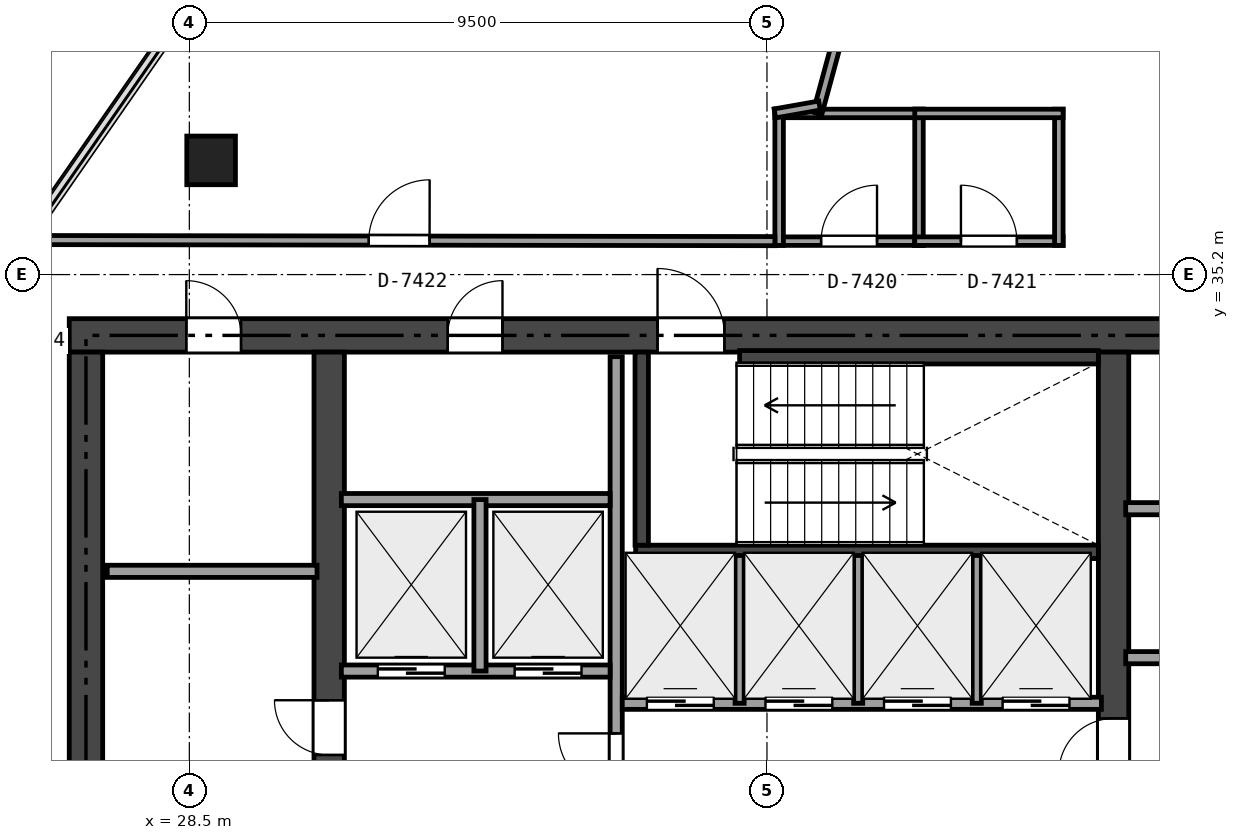
"""IFC4 building model, lengths in metres.
Left out: names, types, materials, properties, quantities, classifications, styles, units other than length and angle.
Written with IfcOpenShell. Run it as: python <this file> out.ifc"""

import sys

from ifc_helpers import new_model, si_unit, direction, frame, frame_2d, origin, origin_2d, place, context, subcontext, project, spatial, rectangle, extrude, element, fill, save


model = new_model("IFC4")
c1 = context("Model", 3, precision=1e-05, world=origin(), true_north=direction((0.0, 1.0)))
c2 = subcontext(c1, "Body", "Model", "MODEL_VIEW")
j1 = project(units=[si_unit("LENGTHUNIT", "METRE"), si_unit("PLANEANGLEUNIT", "RADIAN")], contexts=[c1])
p1 = place(None, origin())
s1 = spatial("IfcSite", under=j1, at=p1, CompositionType="ELEMENT")
p2 = place(p1, origin())
s2 = spatial("IfcBuilding", under=s1, at=p2, CompositionType="ELEMENT")
p3 = place(p2, frame((0.0, 0.0, 275.1)))
s3 = spatial("IfcBuildingStorey", under=s2, at=p3, CompositionType="ELEMENT", Elevation=275.1)
p4 = place(p3, frame((26.525, 34.2, 0.0), z_axis=(0.0, 0.0, 1.0), x_axis=(1.0, 0.0, 0.0)))
e1 = element("IfcWall", 1, at=p4, inside=s3, PredefinedType="SHEAR", context=c2, shape_type="SweptSolid", body=[
    extrude(rectangle(XDim=21.35, YDim=0.55, at=frame_2d((10.675, 0.0))), origin(), (0.0, 0.0, 1.0), 3.92),
])
p5 = place(p4, frame((9.675, 0.0, 0.0)))
e2 = element("IfcOpeningElement", 2, at=p5, cuts=e1, PredefinedType="OPENING", context=c2, shape_type="SweptSolid", body=[
    extrude(rectangle(XDim=1.1, YDim=2.15, at=frame_2d((0.55, 1.075))), frame((0.0, 0.285, 0.0), z_axis=(0.0, -1.0, 0.0), x_axis=(1.0, 0.0, 0.0)), (0.0, 0.0, 1.0), 0.57),
])
p6 = place(p4, frame((1.925, 0.0, 0.0)))
e3 = element("IfcOpeningElement", 3, at=p6, cuts=e1, PredefinedType="OPENING", context=c2, shape_type="SweptSolid", body=[
    extrude(rectangle(XDim=0.9, YDim=2.1, at=frame_2d((0.45, 1.05))), frame((0.0, 0.285, 0.0), z_axis=(0.0, -1.0, 0.0), x_axis=(1.0, 0.0, 0.0)), (0.0, 0.0, 1.0), 0.57),
])
p7 = place(p4, frame((6.225, 0.0, 0.0)))
e4 = element("IfcOpeningElement", 4, at=p7, cuts=e1, PredefinedType="OPENING", context=c2, shape_type="SweptSolid", body=[
    extrude(rectangle(XDim=0.9, YDim=2.1, at=frame_2d((0.45, 1.05))), frame((0.0, 0.285, 0.0), z_axis=(0.0, -1.0, 0.0), x_axis=(1.0, 0.0, 0.0)), (0.0, 0.0, 1.0), 0.57),
])
p8 = place(p3, frame((26.8, 18.875, 0.0), z_axis=(0.0, 0.0, 1.0), x_axis=(0.0, 1.0, 0.0)))
e5 = element("IfcWall", 5, at=p8, inside=s3, PredefinedType="SHEAR", context=c2, shape_type="SweptSolid", body=[
    extrude(rectangle(XDim=15.05, YDim=0.55, at=frame_2d((7.525, 0.0))), origin(), (0.0, 0.0, 1.0), 3.92),
])
p9 = place(p3, frame((30.8, 18.875, 0.0), z_axis=(0.0, 0.0, 1.0), x_axis=(0.0, 1.0, 0.0)))
e6 = element("IfcWall", 6, at=p9, inside=s3, PredefinedType="SHEAR", context=c2, shape_type="SweptSolid", body=[
    extrude(rectangle(XDim=15.05, YDim=0.5, at=frame_2d((7.525, 0.0))), origin(), (0.0, 0.0, 1.0), 3.92),
])
p10 = place(p9, frame((6.625, 0.0, 0.0)))
e7 = element("IfcOpeningElement", 7, at=p10, cuts=e6, PredefinedType="OPENING", context=c2, shape_type="SweptSolid", body=[
    extrude(rectangle(XDim=1.1, YDim=2.15, at=frame_2d((0.55, 1.075))), frame((0.0, 0.26, 0.0), z_axis=(0.0, -1.0, 0.0), x_axis=(1.0, 0.0, 0.0)), (0.0, 0.0, 1.0), 0.52),
])
p11 = place(p9, frame((8.425, 0.0, 0.0)))
e8 = element("IfcOpeningElement", 8, at=p11, cuts=e6, PredefinedType="OPENING", context=c2, shape_type="SweptSolid", body=[
    extrude(rectangle(XDim=0.9, YDim=2.1, at=frame_2d((0.45, 1.05))), frame((0.0, 0.26, 0.0), z_axis=(0.0, -1.0, 0.0), x_axis=(1.0, 0.0, 0.0)), (0.0, 0.0, 1.0), 0.52),
])
p12 = place(p3, frame((43.7, 18.875, 0.0), z_axis=(0.0, 0.0, 1.0), x_axis=(0.0, 1.0, 0.0)))
e9 = element("IfcWall", 9, at=p12, inside=s3, PredefinedType="SHEAR", context=c2, shape_type="SweptSolid", body=[
    extrude(rectangle(XDim=15.05, YDim=0.5, at=frame_2d((7.525, 0.0))), origin(), (0.0, 0.0, 1.0), 3.92),
])
p13 = place(p12, frame((8.125, 0.0, 0.0)))
e10 = element("IfcOpeningElement", 10, at=p13, cuts=e9, PredefinedType="OPENING", context=c2, shape_type="SweptSolid", body=[
    extrude(rectangle(XDim=0.9, YDim=2.1, at=frame_2d((0.45, 1.05))), frame((0.0, 0.26, 0.0), z_axis=(0.0, -1.0, 0.0), x_axis=(1.0, 0.0, 0.0)), (0.0, 0.0, 1.0), 0.52),
])
p14 = place(p3, frame((35.84, 30.64, 0.0), z_axis=(0.0, 0.0, 1.0), x_axis=(1.0, 0.0, 0.0)))
e11 = element("IfcWall", 11, at=p14, inside=s3, PredefinedType="SHEAR", context=c2, shape_type="SweptSolid", body=[
    extrude(rectangle(XDim=7.61, YDim=0.22, at=frame_2d((3.805, 0.0))), origin(), (0.0, 0.0, 1.0), 3.92),
])
p15 = place(p3, frame((35.94, 30.75, 0.0), z_axis=(0.0, 0.0, 1.0), x_axis=(0.0, 1.0, 0.0)))
e12 = element("IfcWall", 12, at=p15, inside=s3, PredefinedType="SHEAR", context=c2, shape_type="SweptSolid", body=[
    extrude(rectangle(XDim=3.175, YDim=0.22, at=frame_2d((1.587, 0.0))), origin(), (0.0, 0.0, 1.0), 3.92),
])
p16 = place(p3, frame((37.55, 33.84, 0.0), z_axis=(0.0, 0.0, 1.0), x_axis=(1.0, 0.0, 0.0)))
e13 = element("IfcWall", 13, at=p16, inside=s3, PredefinedType="SHEAR", context=c2, shape_type="SweptSolid", body=[
    extrude(rectangle(XDim=5.9, YDim=0.22, at=frame_2d((2.95, 0.0))), origin(), (0.0, 0.0, 1.0), 3.92),
])
p17 = place(p3, frame((28.858, 37.078, 0.0), z_axis=(0.0, 0.0, 1.0), x_axis=(1.0, 0.0, 0.0)))
e14 = element("IfcColumn", 14, at=p17, inside=s3, PredefinedType="COLUMN", context=c2, shape_type="SweptSolid", body=[
    extrude(rectangle(XDim=0.8, YDim=0.8, at=origin_2d()), origin(), (0.0, 0.0, 1.0), 3.92),
])
p18 = place(p3, frame((27.15, 30.32, 0.0), z_axis=(0.0, 0.0, 1.0), x_axis=(1.0, 0.0, 0.0)))
e15 = element("IfcWall", 15, at=p18, inside=s3, PredefinedType="SOLIDWALL", context=c2, shape_type="SweptSolid", body=[
    extrude(rectangle(XDim=3.45, YDim=0.2, at=frame_2d((1.725, 0.0))), origin(), (0.0, 0.0, 1.0), 3.92),
])
p19 = place(p3, frame((43.9, 28.9, 0.0), z_axis=(0.0, 0.0, 1.0), x_axis=(1.0, 0.0, 0.0)))
e16 = element("IfcWall", 16, at=p19, inside=s3, PredefinedType="SOLIDWALL", context=c2, shape_type="SweptSolid", body=[
    extrude(rectangle(XDim=3.35, YDim=0.2, at=frame_2d((1.675, 0.0))), origin(), (0.0, 0.0, 1.0), 3.92),
])
p20 = place(p19, frame((1.15, 0.0, 0.0)))
e17 = element("IfcOpeningElement", 17, at=p20, cuts=e16, PredefinedType="OPENING", context=c2, shape_type="SweptSolid", body=[
    extrude(rectangle(XDim=0.9, YDim=2.1, at=frame_2d((0.45, 1.05))), frame((0.0, 0.11, 0.0), z_axis=(0.0, -1.0, 0.0), x_axis=(1.0, 0.0, 0.0)), (0.0, 0.0, 1.0), 0.22),
])
p21 = place(p3, frame((43.9, 31.35, 0.0), z_axis=(0.0, 0.0, 1.0), x_axis=(1.0, 0.0, 0.0)))
e18 = element("IfcWall", 18, at=p21, inside=s3, PredefinedType="SOLIDWALL", context=c2, shape_type="SweptSolid", body=[
    extrude(rectangle(XDim=3.35, YDim=0.2, at=frame_2d((1.675, 0.0))), origin(), (0.0, 0.0, 1.0), 3.549),
])
p22 = place(p3, frame((35.52, 18.95, 0.0), z_axis=(0.0, 0.0, 1.0), x_axis=(0.0, 1.0, 0.0)))
e19 = element("IfcWall", 19, at=p22, inside=s3, PredefinedType="SOLIDWALL", context=c2, shape_type="SweptSolid", body=[
    extrude(rectangle(XDim=14.9, YDim=0.2, at=frame_2d((7.45, 0.0))), origin(), (0.0, 0.0, 1.0), 3.441),
])
p23 = place(p22, frame((7.755, 0.0, 0.0)))
e20 = element("IfcOpeningElement", 20, at=p23, cuts=e19, PredefinedType="OPENING", context=c2, shape_type="SweptSolid", body=[
    extrude(rectangle(XDim=0.95, YDim=2.15, at=frame_2d((0.475, 1.075))), frame((0.0, 0.11, 0.0), z_axis=(0.0, -1.0, 0.0), x_axis=(1.0, 0.0, 0.0)), (0.0, 0.0, 1.0), 0.22),
])
p24 = place(p22, frame((0.6, 0.0, 0.0)))
e21 = element("IfcOpeningElement", 21, at=p24, cuts=e19, PredefinedType="OPENING", context=c2, shape_type="SweptSolid", body=[
    extrude(rectangle(XDim=0.9, YDim=2.1, at=frame_2d((0.45, 1.05))), frame((0.0, 0.11, 0.0), z_axis=(0.0, -1.0, 0.0), x_axis=(1.0, 0.0, 0.0)), (0.0, 0.0, 1.0), 0.22),
])
p25 = place(p3, frame((31.0, 28.68, 0.0), z_axis=(0.0, 0.0, 1.0), x_axis=(1.0, 0.0, 0.0)))
e22 = element("IfcWall", 22, at=p25, inside=s3, PredefinedType="SOLIDWALL", context=c2, shape_type="SweptSolid", body=[
    extrude(rectangle(XDim=4.42, YDim=0.2, at=frame_2d((2.21, 0.0))), origin(), (0.0, 0.0, 1.0), 3.92),
])
p26 = place(p25, frame((0.6, 0.0, 0.0)))
e23 = element("IfcOpeningElement", 23, at=p26, cuts=e22, PredefinedType="OPENING", context=c2, shape_type="SweptSolid", body=[
    extrude(rectangle(XDim=1.1, YDim=2.15, at=frame_2d((0.55, 1.075))), frame((0.0, 0.11, 0.0), z_axis=(0.0, -1.0, 0.0), x_axis=(1.0, 0.0, 0.0)), (0.0, 0.0, 1.0), 0.22),
])
p27 = place(p25, frame((2.85, 0.0, 0.0)))
e24 = element("IfcOpeningElement", 24, at=p27, cuts=e22, PredefinedType="OPENING", context=c2, shape_type="SweptSolid", body=[
    extrude(rectangle(XDim=1.1, YDim=2.15, at=frame_2d((0.55, 1.075))), frame((0.0, 0.11, 0.0), z_axis=(0.0, -1.0, 0.0), x_axis=(1.0, 0.0, 0.0)), (0.0, 0.0, 1.0), 0.22),
])
p28 = place(p3, frame((31.0, 31.5, 0.0), z_axis=(0.0, 0.0, 1.0), x_axis=(1.0, 0.0, 0.0)))
e25 = element("IfcWall", 25, at=p28, inside=s3, PredefinedType="SOLIDWALL", context=c2, shape_type="SweptSolid", body=[
    extrude(rectangle(XDim=4.42, YDim=0.2, at=frame_2d((2.21, 0.0))), origin(), (0.0, 0.0, 1.0), 3.92),
])
p29 = place(p3, frame((33.28, 28.68, 0.0), z_axis=(0.0, 0.0, 1.0), x_axis=(0.0, 1.0, 0.0)))
e26 = element("IfcWall", 26, at=p29, inside=s3, PredefinedType="SOLIDWALL", context=c2, shape_type="SweptSolid", body=[
    extrude(rectangle(XDim=2.82, YDim=0.2, at=frame_2d((1.41, 0.0))), origin(), (0.0, 0.0, 1.0), 3.92),
])
p30 = place(p3, frame((35.62, 28.15, 0.0), z_axis=(0.0, 0.0, 1.0), x_axis=(1.0, 0.0, 0.0)))
e27 = element("IfcWall", 27, at=p30, inside=s3, PredefinedType="SOLIDWALL", context=c2, shape_type="SweptSolid", body=[
    extrude(rectangle(XDim=7.88, YDim=0.2, at=frame_2d((3.94, 0.0))), origin(), (0.0, 0.0, 1.0), 3.92),
])
p31 = place(p30, frame((0.405, 0.0, 0.0)))
e28 = element("IfcOpeningElement", 28, at=p31, cuts=e27, PredefinedType="OPENING", context=c2, shape_type="SweptSolid", body=[
    extrude(rectangle(XDim=1.1, YDim=2.15, at=frame_2d((0.55, 1.075))), frame((0.0, 0.11, 0.0), z_axis=(0.0, -1.0, 0.0), x_axis=(1.0, 0.0, 0.0)), (0.0, 0.0, 1.0), 0.22),
])
p32 = place(p30, frame((2.355, 0.0, 0.0)))
e29 = element("IfcOpeningElement", 29, at=p32, cuts=e27, PredefinedType="OPENING", context=c2, shape_type="SweptSolid", body=[
    extrude(rectangle(XDim=1.1, YDim=2.15, at=frame_2d((0.55, 1.075))), frame((0.0, 0.11, 0.0), z_axis=(0.0, -1.0, 0.0), x_axis=(1.0, 0.0, 0.0)), (0.0, 0.0, 1.0), 0.22),
])
p33 = place(p30, frame((4.305, 0.0, 0.0)))
e30 = element("IfcOpeningElement", 30, at=p33, cuts=e27, PredefinedType="OPENING", context=c2, shape_type="SweptSolid", body=[
    extrude(rectangle(XDim=1.1, YDim=2.15, at=frame_2d((0.55, 1.075))), frame((0.0, 0.11, 0.0), z_axis=(0.0, -1.0, 0.0), x_axis=(1.0, 0.0, 0.0)), (0.0, 0.0, 1.0), 0.22),
])
p34 = place(p30, frame((6.255, 0.0, 0.0)))
e31 = element("IfcOpeningElement", 31, at=p34, cuts=e27, PredefinedType="OPENING", context=c2, shape_type="SweptSolid", body=[
    extrude(rectangle(XDim=1.1, YDim=2.15, at=frame_2d((0.55, 1.075))), frame((0.0, 0.11, 0.0), z_axis=(0.0, -1.0, 0.0), x_axis=(1.0, 0.0, 0.0)), (0.0, 0.0, 1.0), 0.22),
])
for number, where, z_axis, x_axis in (
    (32, (37.55, 28.15, 0.0), (0.0, 0.0, 1.0), (0.0, 1.0, 0.0)),
    (33, (39.5, 28.15, 0.0), (0.0, 0.0, 1.0), (0.0, 1.0, 0.0)),
    (34, (41.45, 28.15, 0.0), (0.0, 0.0, 1.0), (0.0, 1.0, 0.0)),
):
    element("IfcWall", number, at=place(p3, frame(where, z_axis=z_axis, x_axis=x_axis)), inside=s3, PredefinedType="PARTITIONING", context=c2, shape_type="SweptSolid", body=[
        extrude(rectangle(XDim=2.43, YDim=0.15, at=frame_2d((1.215, 0.0))), origin(), (0.0, 0.0, 1.0), 3.92),
    ])
p35 = place(p3, frame((38.13, 35.75, 0.0), z_axis=(0.0, 0.0, 1.0), x_axis=(1.0, 0.0, 0.0)))
e35 = element("IfcWall", 35, at=p35, inside=s3, PredefinedType="PARTITIONING", context=c2, shape_type="SweptSolid", body=[
    extrude(rectangle(XDim=2.44, YDim=0.14, at=frame_2d((1.22, 0.0))), origin(), (0.0, 0.0, 1.0), 3.441),
])
p36 = place(p35, frame((0.76, 0.0, 0.0)))
e36 = element("IfcOpeningElement", 36, at=p36, cuts=e35, PredefinedType="OPENING", context=c2, shape_type="SweptSolid", body=[
    extrude(rectangle(XDim=0.92, YDim=2.1, at=frame_2d((0.46, 1.05))), frame((0.0, 0.08, 0.0), z_axis=(0.0, -1.0, 0.0), x_axis=(1.0, 0.0, 0.0)), (0.0, 0.0, 1.0), 0.16),
])
p37 = place(p3, frame((40.5, 35.68, 0.0), z_axis=(0.0, 0.0, 1.0), x_axis=(0.0, 1.0, 0.0)))
e37 = element("IfcWall", 37, at=p37, inside=s3, PredefinedType="PARTITIONING", context=c2, shape_type="SweptSolid", body=[
    extrude(rectangle(XDim=2.24, YDim=0.14, at=frame_2d((1.12, 0.0))), origin(), (0.0, 0.0, 1.0), 3.549),
])
p38 = place(p3, frame((40.57, 37.85, 0.0), z_axis=(0.0, 0.0, 1.0), x_axis=(-1.0, 0.0, 0.0)))
e38 = element("IfcWall", 38, at=p38, inside=s3, PredefinedType="PARTITIONING", context=c2, shape_type="SweptSolid", body=[
    extrude(rectangle(XDim=2.44, YDim=0.14, at=frame_2d((1.22, 0.0))), origin(), (0.0, 0.0, 1.0), 3.441),
])
p39 = place(p3, frame((38.2, 37.92, 0.0), z_axis=(0.0, 0.0, 1.0), x_axis=(0.0, -1.0, 0.0)))
e39 = element("IfcWall", 39, at=p39, inside=s3, PredefinedType="PARTITIONING", context=c2, shape_type="SweptSolid", body=[
    extrude(rectangle(XDim=2.24, YDim=0.14, at=frame_2d((1.12, 0.0))), origin(), (0.0, 0.0, 1.0), 3.549),
])
p40 = place(p3, frame((40.43, 35.75, 0.0), z_axis=(0.0, 0.0, 1.0), x_axis=(1.0, 0.0, 0.0)))
e40 = element("IfcWall", 40, at=p40, inside=s3, PredefinedType="PARTITIONING", context=c2, shape_type="SweptSolid", body=[
    extrude(rectangle(XDim=2.44, YDim=0.14, at=frame_2d((1.22, 0.0))), origin(), (0.0, 0.0, 1.0), 3.441),
])
p41 = place(p40, frame((0.76, 0.0, 0.0)))
e41 = element("IfcOpeningElement", 41, at=p41, cuts=e40, PredefinedType="OPENING", context=c2, shape_type="SweptSolid", body=[
    extrude(rectangle(XDim=0.92, YDim=2.1, at=frame_2d((0.46, 1.05))), frame((0.0, 0.08, 0.0), z_axis=(0.0, -1.0, 0.0), x_axis=(1.0, 0.0, 0.0)), (0.0, 0.0, 1.0), 0.16),
])
p42 = place(p3, frame((42.8, 35.68, 0.0), z_axis=(0.0, 0.0, 1.0), x_axis=(0.0, 1.0, 0.0)))
e42 = element("IfcWall", 42, at=p42, inside=s3, PredefinedType="PARTITIONING", context=c2, shape_type="SweptSolid", body=[
    extrude(rectangle(XDim=2.24, YDim=0.14, at=frame_2d((1.12, 0.0))), origin(), (0.0, 0.0, 1.0), 3.549),
])
p43 = place(p3, frame((42.87, 37.85, 0.0), z_axis=(0.0, 0.0, 1.0), x_axis=(-1.0, 0.0, 0.0)))
e43 = element("IfcWall", 43, at=p43, inside=s3, PredefinedType="PARTITIONING", context=c2, shape_type="SweptSolid", body=[
    extrude(rectangle(XDim=2.44, YDim=0.14, at=frame_2d((1.22, 0.0))), origin(), (0.0, 0.0, 1.0), 3.441),
])
p44 = place(p3, frame((38.829, 37.85, 0.0), z_axis=(0.0, 0.0, 1.0), x_axis=(0.262306419942, 0.964984633068, 0.0)))
e44 = element("IfcWall", 44, at=p44, inside=s3, PredefinedType="PARTITIONING", context=c2, shape_type="SweptSolid", body=[
    extrude(rectangle(XDim=8.509, YDim=0.15, at=frame_2d((4.254, 0.0))), origin(), (0.0, 0.0, 1.0), 3.445),
])
p45 = place(p3, frame((25.772, 35.768, 0.0), z_axis=(0.0, 0.0, 1.0), x_axis=(0.999998931381, -0.001461928976, 0.0)))
e45 = element("IfcWall", 45, at=p45, inside=s3, PredefinedType="PARTITIONING", context=c2, shape_type="SweptSolid", body=[
    extrude(rectangle(XDim=12.358, YDim=0.15, at=frame_2d((6.179, 0.0))), origin(), (0.0, 0.0, 1.0), 3.365),
])
p46 = place(p45, frame((5.679, 0.0, 0.0)))
e46 = element("IfcOpeningElement", 46, at=p46, cuts=e45, PredefinedType="OPENING", context=c2, shape_type="SweptSolid", body=[
    extrude(rectangle(XDim=1.0, YDim=2.15, at=frame_2d((0.5, 1.075))), frame((0.0, 0.085, 0.0), z_axis=(0.0, -1.0, 0.0), x_axis=(1.0, 0.0, 0.0)), (0.0, 0.0, 1.0), 0.17),
])
p47 = place(p3, frame((38.13, 37.85, 0.0), z_axis=(0.0, 0.0, 1.0), x_axis=(0.984707641081, 0.174214986716, 0.0)))
e47 = element("IfcWall", 47, at=p47, inside=s3, PredefinedType="PARTITIONING", context=c2, shape_type="SweptSolid", body=[
    extrude(rectangle(XDim=0.746, YDim=0.15, at=frame_2d((0.373, 0.0))), origin(), (0.0, 0.0, 1.0), 3.92),
])
p48 = place(p5, origin())
e48 = element("IfcDoor", 48, at=p48, inside=s3, OperationType="SINGLE_SWING_LEFT", PredefinedType="DOOR", context=c2, shape_type="SweptSolid", body=[
    extrude(rectangle(XDim=1.1, YDim=2.15, at=frame_2d((0.55, 1.075))), frame((0.0, 0.025, 0.0), z_axis=(0.0, -1.0, 0.0), x_axis=(1.0, 0.0, 0.0)), (0.0, 0.0, 1.0), 0.05),
])
fill(e2, e48)
p49 = place(p23, origin())
e49 = element("IfcDoor", 49, at=p49, inside=s3, OperationType="SINGLE_SWING_RIGHT", PredefinedType="DOOR", context=c2, shape_type="SweptSolid", body=[
    extrude(rectangle(XDim=0.95, YDim=2.15, at=frame_2d((0.475, 1.075))), frame((0.0, 0.025, 0.0), z_axis=(0.0, -1.0, 0.0), x_axis=(1.0, 0.0, 0.0)), (0.0, 0.0, 1.0), 0.05),
])
fill(e20, e49)
p50 = place(p13, origin())
e50 = element("IfcDoor", 50, at=p50, inside=s3, OperationType="SINGLE_SWING_LEFT", PredefinedType="DOOR", context=c2, shape_type="SweptSolid", body=[
    extrude(rectangle(XDim=0.9, YDim=2.1, at=frame_2d((0.45, 1.05))), frame((0.0, 0.025, 0.0), z_axis=(0.0, -1.0, 0.0), x_axis=(1.0, 0.0, 0.0)), (0.0, 0.0, 1.0), 0.05),
])
fill(e10, e50)
p51 = place(p11, origin())
e51 = element("IfcDoor", 51, at=p51, inside=s3, OperationType="SINGLE_SWING_RIGHT", PredefinedType="DOOR", context=c2, shape_type="SweptSolid", body=[
    extrude(rectangle(XDim=0.9, YDim=2.1, at=frame_2d((0.45, 1.05))), frame((0.0, 0.025, 0.0), z_axis=(0.0, -1.0, 0.0), x_axis=(1.0, 0.0, 0.0)), (0.0, 0.0, 1.0), 0.05),
])
fill(e8, e51)
p52 = place(p6, origin())
e52 = element("IfcDoor", 52, at=p52, inside=s3, OperationType="SINGLE_SWING_LEFT", PredefinedType="DOOR", context=c2, shape_type="SweptSolid", body=[
    extrude(rectangle(XDim=0.9, YDim=2.1, at=frame_2d((0.45, 1.05))), frame((0.0, 0.025, 0.0), z_axis=(0.0, -1.0, 0.0), x_axis=(1.0, 0.0, 0.0)), (0.0, 0.0, 1.0), 0.05),
])
fill(e3, e52)
p53 = place(p7, origin())
e53 = element("IfcDoor", 53, at=p53, inside=s3, OperationType="SINGLE_SWING_RIGHT", PredefinedType="DOOR", context=c2, shape_type="SweptSolid", body=[
    extrude(rectangle(XDim=0.9, YDim=2.1, at=frame_2d((0.45, 1.05))), frame((0.0, 0.025, 0.0), z_axis=(0.0, -1.0, 0.0), x_axis=(1.0, 0.0, 0.0)), (0.0, 0.0, 1.0), 0.05),
])
fill(e4, e53)
p54 = place(p26, origin())
e54 = element("IfcDoor", 54, at=p54, inside=s3, OperationType="SLIDING_TO_LEFT", PredefinedType="DOOR", context=c2, shape_type="SweptSolid", body=[
    extrude(rectangle(XDim=1.1, YDim=2.15, at=frame_2d((0.55, 1.075))), frame((0.0, 0.025, 0.0), z_axis=(0.0, -1.0, 0.0), x_axis=(1.0, 0.0, 0.0)), (0.0, 0.0, 1.0), 0.05),
])
fill(e23, e54)
p55 = place(p27, origin())
e55 = element("IfcDoor", 55, at=p55, inside=s3, OperationType="SLIDING_TO_LEFT", PredefinedType="DOOR", context=c2, shape_type="SweptSolid", body=[
    extrude(rectangle(XDim=1.1, YDim=2.15, at=frame_2d((0.55, 1.075))), frame((0.0, 0.025, 0.0), z_axis=(0.0, -1.0, 0.0), x_axis=(1.0, 0.0, 0.0)), (0.0, 0.0, 1.0), 0.05),
])
fill(e24, e55)
p56 = place(p31, origin())
e56 = element("IfcDoor", 56, at=p56, inside=s3, OperationType="SLIDING_TO_LEFT", PredefinedType="DOOR", context=c2, shape_type="SweptSolid", body=[
    extrude(rectangle(XDim=1.1, YDim=2.15, at=frame_2d((0.55, 1.075))), frame((0.0, 0.025, 0.0), z_axis=(0.0, -1.0, 0.0), x_axis=(1.0, 0.0, 0.0)), (0.0, 0.0, 1.0), 0.05),
])
fill(e28, e56)
p57 = place(p32, origin())
e57 = element("IfcDoor", 57, at=p57, inside=s3, OperationType="SLIDING_TO_LEFT", PredefinedType="DOOR", context=c2, shape_type="SweptSolid", body=[
    extrude(rectangle(XDim=1.1, YDim=2.15, at=frame_2d((0.55, 1.075))), frame((0.0, 0.025, 0.0), z_axis=(0.0, -1.0, 0.0), x_axis=(1.0, 0.0, 0.0)), (0.0, 0.0, 1.0), 0.05),
])
fill(e29, e57)
p58 = place(p33, origin())
e58 = element("IfcDoor", 58, at=p58, inside=s3, OperationType="SLIDING_TO_LEFT", PredefinedType="DOOR", context=c2, shape_type="SweptSolid", body=[
    extrude(rectangle(XDim=1.1, YDim=2.15, at=frame_2d((0.55, 1.075))), frame((0.0, 0.025, 0.0), z_axis=(0.0, -1.0, 0.0), x_axis=(1.0, 0.0, 0.0)), (0.0, 0.0, 1.0), 0.05),
])
fill(e30, e58)
p59 = place(p34, origin())
e59 = element("IfcDoor", 59, at=p59, inside=s3, OperationType="SLIDING_TO_LEFT", PredefinedType="DOOR", context=c2, shape_type="SweptSolid", body=[
    extrude(rectangle(XDim=1.1, YDim=2.15, at=frame_2d((0.55, 1.075))), frame((0.0, 0.025, 0.0), z_axis=(0.0, -1.0, 0.0), x_axis=(1.0, 0.0, 0.0)), (0.0, 0.0, 1.0), 0.05),
])
fill(e31, e59)
p60 = place(p36, origin())
e60 = element("IfcDoor", 60, at=p60, inside=s3, OperationType="SINGLE_SWING_RIGHT", PredefinedType="DOOR", context=c2, shape_type="SweptSolid", body=[
    extrude(rectangle(XDim=0.92, YDim=2.1, at=frame_2d((0.46, 1.05))), frame((0.0, 0.025, 0.0), z_axis=(0.0, -1.0, 0.0), x_axis=(1.0, 0.0, 0.0)), (0.0, 0.0, 1.0), 0.05),
])
fill(e36, e60)
p61 = place(p41, origin())
e61 = element("IfcDoor", 61, at=p61, inside=s3, OperationType="SINGLE_SWING_LEFT", PredefinedType="DOOR", context=c2, shape_type="SweptSolid", body=[
    extrude(rectangle(XDim=0.92, YDim=2.1, at=frame_2d((0.46, 1.05))), frame((0.0, 0.025, 0.0), z_axis=(0.0, -1.0, 0.0), x_axis=(1.0, 0.0, 0.0)), (0.0, 0.0, 1.0), 0.05),
])
fill(e41, e61)
p62 = place(p46, origin())
e62 = element("IfcDoor", 62, at=p62, inside=s3, OperationType="SINGLE_SWING_RIGHT", PredefinedType="DOOR", context=c2, shape_type="SweptSolid", body=[
    extrude(rectangle(XDim=1.0, YDim=2.15, at=frame_2d((0.5, 1.075))), frame((0.0, 0.025, 0.0), z_axis=(0.0, -1.0, 0.0), x_axis=(1.0, 0.0, 0.0)), (0.0, 0.0, 1.0), 0.05),
])
fill(e46, e62)
save(model, sys.argv[1])
